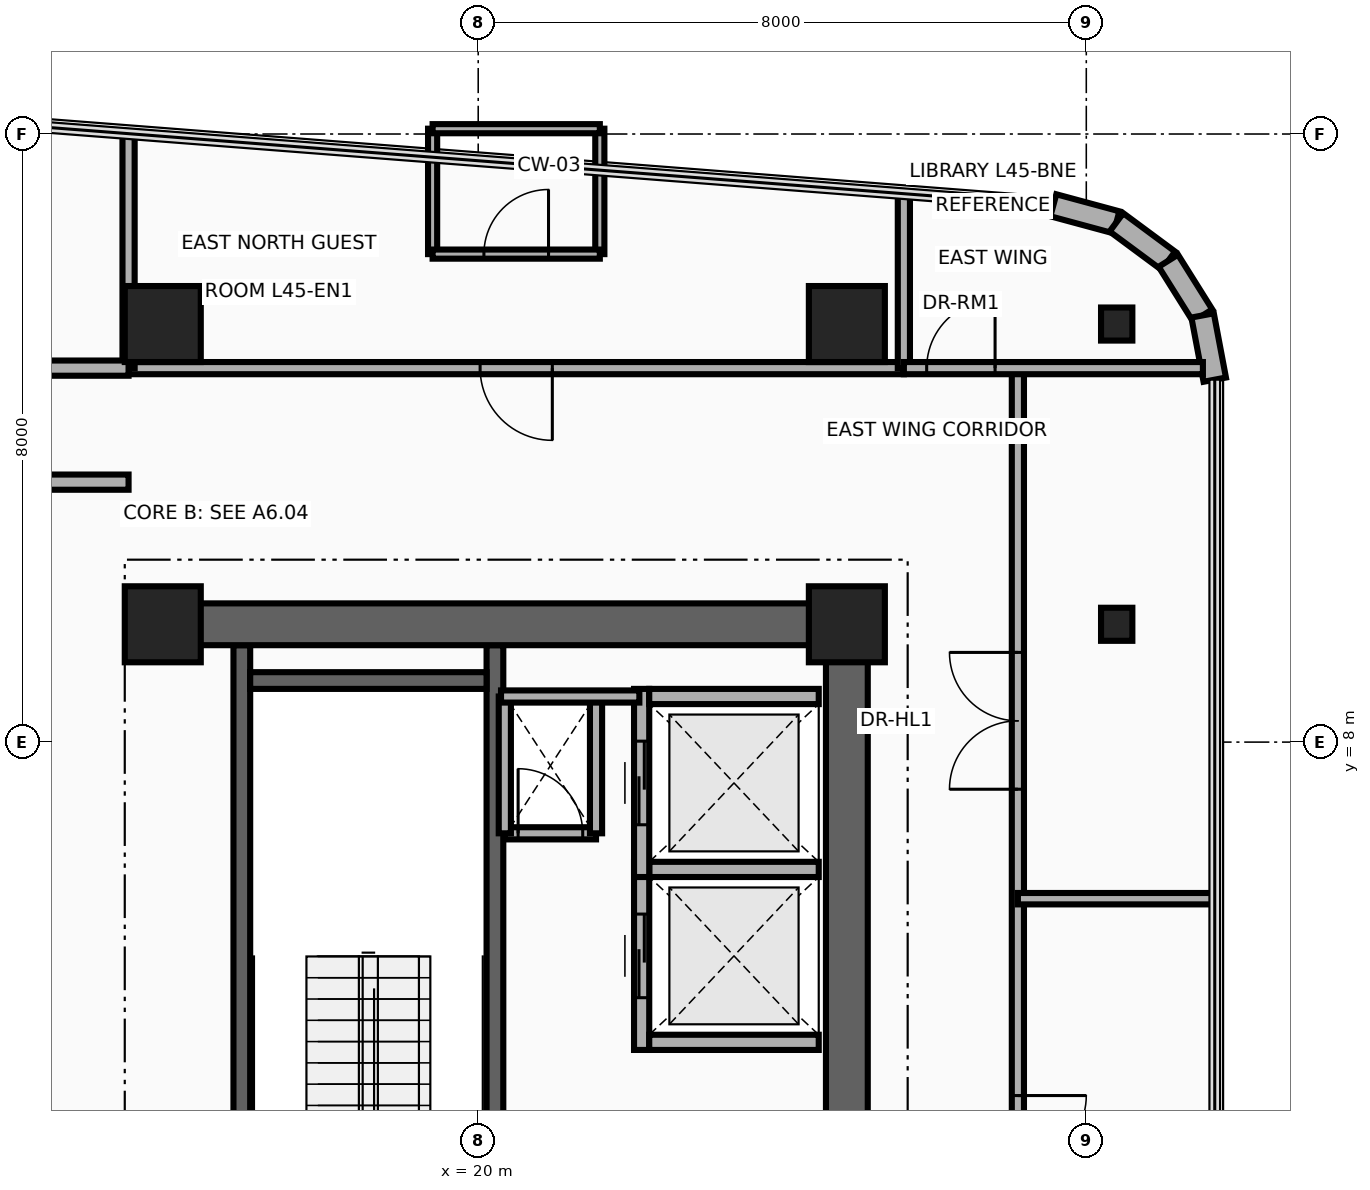
"""IFC4 building model, lengths in metres.
Left out: names, types, materials, properties, quantities, classifications, styles, units other than length and angle.
Written with IfcOpenShell. Run it as: python <this file> out.ifc"""

import sys

from ifc_helpers import new_model, si_unit, direction, frame, frame_2d, origin, origin_2d, place, context, subcontext, project, spatial, rectangle, i_section, extrude, source, transform, mapped, element, fill, save


model = new_model("IFC4")
c1 = context("Model", 3, precision=1e-05, world=origin(), true_north=direction((0.0, 1.0)))
c2 = subcontext(c1, "Body", "Model", "MODEL_VIEW")
j1 = project(units=[si_unit("LENGTHUNIT", "METRE"), si_unit("PLANEANGLEUNIT", "RADIAN")], contexts=[c1])
p1 = place(None, origin())
s1 = spatial("IfcSite", under=j1, at=p1, CompositionType="ELEMENT")
p2 = place(p1, origin())
s2 = spatial("IfcBuilding", under=s1, at=p2, CompositionType="ELEMENT")
p3 = place(p2, frame((0.0, 0.0, 176.55)))
s3 = spatial("IfcBuildingStorey", under=s2, at=p3, CompositionType="ELEMENT", Elevation=176.55)
for number, where, z_axis, x_axis in (
    (1, (16.89, 0.68, 0.0), (0.0, 0.0, 1.0), (0.0, 1.0, 0.0)),
    (2, (20.22, 0.68, 0.0), (0.0, 0.0, 1.0), (0.0, 1.0, 0.0)),
):
    element("IfcWall", number, at=place(p3, frame(where, z_axis=z_axis, x_axis=x_axis)), inside=s3, PredefinedType="SHEAR", context=c2, shape_type="SweptSolid", body=[
        extrude(rectangle(XDim=8.595, YDim=0.22, at=frame_2d((4.297, 0.0))), origin(), (0.0, 0.0, 1.0), 3.63),
    ])
p4 = place(p3, frame((17.0, 8.81, 0.0), z_axis=(0.0, 0.0, 1.0), x_axis=(1.0, 0.0, 0.0)))
e3 = element("IfcWall", 3, at=p4, inside=s3, PredefinedType="SHEAR", context=c2, shape_type="SweptSolid", body=[
    extrude(rectangle(XDim=3.11, YDim=0.22, at=frame_2d((1.555, 0.0))), origin(), (0.0, 0.0, 1.0), 3.63),
])
p5 = place(p3, frame((24.85, 0.95, 0.0), z_axis=(0.0, 0.0, 1.0), x_axis=(0.0, 1.0, 0.0)))
e4 = element("IfcWall", 4, at=p5, inside=s3, PredefinedType="SHEAR", context=c2, shape_type="SweptSolid", body=[
    extrude(rectangle(XDim=8.875, YDim=0.55, at=frame_2d((4.438, 0.0))), origin(), (0.0, 0.0, 1.0), 3.63),
])
p6 = place(p3, frame((15.85, 9.55, 0.0), z_axis=(0.0, 0.0, 1.0), x_axis=(1.0, 0.0, 0.0)))
e5 = element("IfcWall", 5, at=p6, inside=s3, PredefinedType="SHEAR", context=c2, shape_type="SweptSolid", body=[
    extrude(rectangle(XDim=9.0, YDim=0.55, at=frame_2d((4.5, 0.0))), origin(), (0.0, 0.0, 1.0), 3.63),
])
m1 = source(origin(), c2, "Body", "SweptSolid", [
    extrude(rectangle(XDim=1.0, YDim=1.0, at=origin_2d()), origin(), (0.0, 0.0, 1.0), 3.95),
])
for number, where, z_axis, x_axis in (
    (6, (15.85, 9.55, 0.0), (0.0, 0.0, 1.0), (1.0, 0.0, 0.0)),
    (7, (24.85, 9.55, 0.0), (0.0, 0.0, 1.0), (1.0, 0.0, 0.0)),
):
    element("IfcColumn", number, at=place(p3, frame(where, z_axis=z_axis, x_axis=x_axis)), inside=s3, PredefinedType="COLUMN", context=c2, shape_type="MappedRepresentation", body=[
        mapped(m1, transform((0.0, 0.0, 0.0), x_axis=(1.0, 0.0, 0.0), y_axis=(0.0, 1.0, 0.0), z_axis=(0.0, 0.0, 1.0), scale=1.0)),
    ])
m2 = source(origin(), c2, "Body", "SweptSolid", [
    extrude(i_section(OverallWidth=0.412, OverallDepth=0.435, WebThickness=0.036, FlangeThickness=0.057, at=origin_2d()), origin(), (0.0, 0.0, 1.0), 3.95),
])
p7 = place(p3, frame((28.4, 9.55, 0.0), z_axis=(0.0, 0.0, 1.0), x_axis=(1.0, 0.0, 0.0)))
e8 = element("IfcColumn", 8, at=p7, inside=s3, PredefinedType="COLUMN", context=c2, shape_type="MappedRepresentation", body=[
    mapped(m2, transform((0.0, 0.0, 0.0), x_axis=(1.0, 0.0, 0.0), y_axis=(0.0, 1.0, 0.0), z_axis=(0.0, 0.0, 1.0), scale=1.0)),
])
for number, where, z_axis, x_axis in (
    (9, (15.85, 13.5, 0.0), (0.0, 0.0, 1.0), (1.0, 0.0, 0.0)),
    (10, (24.85, 13.5, 0.0), (0.0, 0.0, 1.0), (1.0, 0.0, 0.0)),
):
    element("IfcColumn", number, at=place(p3, frame(where, z_axis=z_axis, x_axis=x_axis)), inside=s3, PredefinedType="COLUMN", context=c2, shape_type="MappedRepresentation", body=[
        mapped(m1, transform((0.0, 0.0, 0.0), x_axis=(1.0, 0.0, 0.0), y_axis=(0.0, 1.0, 0.0), z_axis=(0.0, 0.0, 1.0), scale=1.0)),
    ])
p8 = place(p3, frame((28.4, 13.5, 0.0), z_axis=(0.0, 0.0, 1.0), x_axis=(1.0, 0.0, 0.0)))
e11 = element("IfcColumn", 11, at=p8, inside=s3, PredefinedType="COLUMN", context=c2, shape_type="MappedRepresentation", body=[
    mapped(m2, transform((0.0, 0.0, 0.0), x_axis=(1.0, 0.0, 0.0), y_axis=(0.0, 1.0, 0.0), z_axis=(0.0, 0.0, 1.0), scale=1.0)),
])
p9 = place(p3, frame((27.566, 15.062, 0.0), z_axis=(0.0, 0.0, 1.0), x_axis=(0.965357594382, -0.260930479187, 0.0)))
e12 = element("IfcWall", 12, at=p9, inside=s3, PredefinedType="SOLIDWALL", context=c2, shape_type="SweptSolid", body=[
    extrude(rectangle(XDim=0.86, YDim=0.3, at=frame_2d((0.43, 0.0))), origin(), (0.0, 0.0, 1.0), 3.63),
])
p10 = place(p3, frame((28.396, 14.838, 0.0), z_axis=(0.0, 0.0, 1.0), x_axis=(0.803847397988, -0.594835574548, 0.0)))
e13 = element("IfcWall", 13, at=p10, inside=s3, PredefinedType="SOLIDWALL", context=c2, shape_type="SweptSolid", body=[
    extrude(rectangle(XDim=0.849, YDim=0.3, at=frame_2d((0.425, 0.0))), origin(), (0.0, 0.0, 1.0), 3.63),
])
p11 = place(p3, frame((29.079, 14.333, 0.0), z_axis=(0.0, 0.0, 1.0), x_axis=(0.53134147342, -0.847157741288, 0.0)))
e14 = element("IfcWall", 14, at=p11, inside=s3, PredefinedType="SOLIDWALL", context=c2, shape_type="SweptSolid", body=[
    extrude(rectangle(XDim=0.85, YDim=0.3, at=frame_2d((0.425, 0.0))), origin(), (0.0, 0.0, 1.0), 3.63),
])
p12 = place(p3, frame((29.531, 13.613, 0.0), z_axis=(0.0, 0.0, 1.0), x_axis=(0.185402686284, -0.982662629756, 0.0)))
e15 = element("IfcWall", 15, at=p12, inside=s3, PredefinedType="SOLIDWALL", context=c2, shape_type="SweptSolid", body=[
    extrude(rectangle(XDim=0.86, YDim=0.3, at=frame_2d((0.43, 0.0))), origin(), (0.0, 0.0, 1.0), 3.63),
])
p13 = place(p3, frame((22.15, 3.95, 0.0), z_axis=(0.0, 0.0, 1.0), x_axis=(0.0, 1.0, 0.0)))
e16 = element("IfcWall", 16, at=p13, inside=s3, PredefinedType="MOVABLE", context=c2, shape_type="SweptSolid", body=[
    extrude(rectangle(XDim=2.475, YDim=0.2, at=frame_2d((1.238, 0.0))), origin(), (0.0, 0.0, 1.0), 3.63),
])
p14 = place(p13, frame((0.688, 0.0, 0.0)))
e17 = element("IfcOpeningElement", 17, at=p14, cuts=e16, PredefinedType="OPENING", context=c2, shape_type="SweptSolid", body=[
    extrude(rectangle(XDim=1.1, YDim=2.1, at=frame_2d((0.55, 1.05))), frame((0.0, 0.115, 0.0), z_axis=(0.0, -1.0, 0.0), x_axis=(1.0, 0.0, 0.0)), (0.0, 0.0, 1.0), 0.23),
])
for number, where, z_axis, x_axis in (
    (18, (22.25, 4.05, 0.0), (0.0, 0.0, 1.0), (1.0, 0.0, 0.0)),
    (19, (22.25, 6.325, 0.0), (0.0, 0.0, 1.0), (1.0, 0.0, 0.0)),
):
    element("IfcWall", number, at=place(p3, frame(where, z_axis=z_axis, x_axis=x_axis)), inside=s3, PredefinedType="MOVABLE", context=c2, shape_type="SweptSolid", body=[
        extrude(rectangle(XDim=2.23, YDim=0.2, at=frame_2d((1.115, 0.0))), origin(), (0.0, 0.0, 1.0), 3.63),
    ])
p15 = place(p3, frame((22.15, 6.225, 0.0), z_axis=(0.0, 0.0, 1.0), x_axis=(0.0, 1.0, 0.0)))
e20 = element("IfcWall", 20, at=p15, inside=s3, PredefinedType="MOVABLE", context=c2, shape_type="SweptSolid", body=[
    extrude(rectangle(XDim=2.475, YDim=0.2, at=frame_2d((1.237, 0.0))), origin(), (0.0, 0.0, 1.0), 3.63),
])
p16 = place(p15, frame((0.688, 0.0, 0.0)))
e21 = element("IfcOpeningElement", 21, at=p16, cuts=e20, PredefinedType="OPENING", context=c2, shape_type="SweptSolid", body=[
    extrude(rectangle(XDim=1.1, YDim=2.1, at=frame_2d((0.55, 1.05))), frame((0.0, 0.115, 0.0), z_axis=(0.0, -1.0, 0.0), x_axis=(1.0, 0.0, 0.0)), (0.0, 0.0, 1.0), 0.23),
])
p17 = place(p3, frame((22.25, 8.6, 0.0), z_axis=(0.0, 0.0, 1.0), x_axis=(1.0, 0.0, 0.0)))
e22 = element("IfcWall", 22, at=p17, inside=s3, PredefinedType="MOVABLE", context=c2, shape_type="SweptSolid", body=[
    extrude(rectangle(XDim=2.23, YDim=0.2, at=frame_2d((1.115, 0.0))), origin(), (0.0, 0.0, 1.0), 3.63),
])
p18 = place(p3, frame((20.35, 6.8, 0.0), z_axis=(0.0, 0.0, 1.0), x_axis=(1.0, 0.0, 0.0)))
e23 = element("IfcWall", 23, at=p18, inside=s3, PredefinedType="PARTITIONING", context=c2, shape_type="SweptSolid", body=[
    extrude(rectangle(XDim=1.2, YDim=0.16, at=frame_2d((0.6, 0.0))), origin(), (0.0, 0.0, 1.0), 3.63),
])
p19 = place(p18, frame((0.175, 0.0, 0.0)))
e24 = element("IfcOpeningElement", 24, at=p19, cuts=e23, PredefinedType="OPENING", context=c2, shape_type="SweptSolid", body=[
    extrude(rectangle(XDim=0.85, YDim=2.05, at=frame_2d((0.425, 1.025))), frame((0.0, 0.095, 0.0), z_axis=(0.0, -1.0, 0.0), x_axis=(1.0, 0.0, 0.0)), (0.0, 0.0, 1.0), 0.19),
])
for number, where, z_axis, x_axis in (
    (25, (21.55, 6.8, 0.0), (0.0, 0.0, 1.0), (0.0, 1.0, 0.0)),
    (26, (20.35, 6.8, 0.0), (0.0, 0.0, 1.0), (0.0, 1.0, 0.0)),
):
    element("IfcWall", number, at=place(p3, frame(where, z_axis=z_axis, x_axis=x_axis)), inside=s3, PredefinedType="PARTITIONING", context=c2, shape_type="SweptSolid", body=[
        extrude(rectangle(XDim=1.8, YDim=0.16, at=frame_2d((0.9, 0.0))), origin(), (0.0, 0.0, 1.0), 3.63),
    ])
p20 = place(p3, frame((20.3, 8.6, 0.0), z_axis=(0.0, 0.0, 1.0), x_axis=(1.0, 0.0, 0.0)))
e27 = element("IfcWall", 27, at=p20, inside=s3, PredefinedType="PARTITIONING", context=c2, shape_type="SweptSolid", body=[
    extrude(rectangle(XDim=1.82, YDim=0.16, at=frame_2d((0.91, 0.0))), origin(), (0.0, 0.0, 1.0), 3.63),
])
p21 = place(p3, frame((15.4, 12.92, 0.0), z_axis=(0.0, 0.0, 1.0), x_axis=(1.0, 0.0, 0.0)))
e28 = element("IfcWall", 28, at=p21, inside=s3, PredefinedType="PARTITIONING", context=c2, shape_type="SweptSolid", body=[
    extrude(rectangle(XDim=10.2, YDim=0.16, at=frame_2d((5.1, 0.0))), origin(), (0.0, 0.0, 1.0), 3.004),
])
p22 = place(p21, frame((4.625, 0.0, 0.0)))
e29 = element("IfcOpeningElement", 29, at=p22, cuts=e28, PredefinedType="OPENING", context=c2, shape_type="SweptSolid", body=[
    extrude(rectangle(XDim=0.95, YDim=2.15, at=frame_2d((0.475, 1.075))), frame((0.0, 0.095, 0.0), z_axis=(0.0, -1.0, 0.0), x_axis=(1.0, 0.0, 0.0)), (0.0, 0.0, 1.0), 0.19),
])
p23 = place(p3, frame((15.4, 12.92, 0.0), z_axis=(0.0, 0.0, 1.0), x_axis=(0.0, 1.0, 0.0)))
e30 = element("IfcWall", 30, at=p23, inside=s3, PredefinedType="PARTITIONING", context=c2, shape_type="SweptSolid", body=[
    extrude(rectangle(XDim=3.084, YDim=0.16, at=frame_2d((1.542, 0.0))), origin(), (0.0, 0.0, 1.0), 2.665),
])
p24 = place(p3, frame((25.6, 12.92, 0.0), z_axis=(0.0, 0.0, 1.0), x_axis=(0.0, 1.0, 0.0)))
e31 = element("IfcWall", 31, at=p24, inside=s3, PredefinedType="PARTITIONING", context=c2, shape_type="SweptSolid", body=[
    extrude(rectangle(XDim=2.295, YDim=0.16, at=frame_2d((1.147, 0.0))), origin(), (0.0, 0.0, 1.0), 2.665),
])
for number, where, z_axis, x_axis in (
    (32, (19.4, 14.42, 0.0), (0.0, 0.0, 1.0), (0.0, 1.0, 0.0)),
    (33, (21.6, 14.42, 0.0), (0.0, 0.0, 1.0), (0.0, 1.0, 0.0)),
):
    element("IfcWall", number, at=place(p3, frame(where, z_axis=z_axis, x_axis=x_axis)), inside=s3, PredefinedType="PARTITIONING", context=c2, shape_type="SweptSolid", body=[
        extrude(rectangle(XDim=1.65, YDim=0.12, at=frame_2d((0.825, 0.0))), origin(), (0.0, 0.0, 1.0), 3.63),
    ])
p25 = place(p3, frame((19.4, 16.07, 0.0), z_axis=(0.0, 0.0, 1.0), x_axis=(1.0, 0.0, 0.0)))
e34 = element("IfcWall", 34, at=p25, inside=s3, PredefinedType="PARTITIONING", context=c2, shape_type="SweptSolid", body=[
    extrude(rectangle(XDim=2.2, YDim=0.12, at=frame_2d((1.1, 0.0))), origin(), (0.0, 0.0, 1.0), 3.63),
])
p26 = place(p3, frame((19.4, 14.42, 0.0), z_axis=(0.0, 0.0, 1.0), x_axis=(1.0, 0.0, 0.0)))
e35 = element("IfcWall", 35, at=p26, inside=s3, PredefinedType="PARTITIONING", context=c2, shape_type="SweptSolid", body=[
    extrude(rectangle(XDim=2.2, YDim=0.12, at=frame_2d((1.1, 0.0))), origin(), (0.0, 0.0, 1.0), 3.63),
])
p27 = place(p26, frame((0.675, 0.0, 0.0)))
e36 = element("IfcOpeningElement", 36, at=p27, cuts=e35, PredefinedType="OPENING", context=c2, shape_type="SweptSolid", body=[
    extrude(rectangle(XDim=0.85, YDim=2.1, at=frame_2d((0.425, 1.05))), frame((0.0, 0.075, 0.0), z_axis=(0.0, -1.0, 0.0), x_axis=(1.0, 0.0, 0.0)), (0.0, 0.0, 1.0), 0.15),
])
p28 = place(p3, frame((27.1, -11.89, 0.0), z_axis=(0.0, 0.0, 1.0), x_axis=(0.0, 1.0, 0.0)))
e37 = element("IfcWall", 37, at=p28, inside=s3, PredefinedType="PARTITIONING", context=c2, shape_type="SweptSolid", body=[
    extrude(rectangle(XDim=24.81, YDim=0.16, at=frame_2d((12.405, 0.0))), origin(), (0.0, 0.0, 1.0), 2.665),
])
p29 = place(p28, frame((1.12, 0.0, 0.0)))
e38 = element("IfcOpeningElement", 38, at=p29, cuts=e37, PredefinedType="OPENING", context=c2, shape_type="SweptSolid", body=[
    extrude(rectangle(XDim=0.9, YDim=2.1, at=frame_2d((0.45, 1.05))), frame((0.0, 0.095, 0.0), z_axis=(0.0, -1.0, 0.0), x_axis=(1.0, 0.0, 0.0)), (0.0, 0.0, 1.0), 0.19),
])
p30 = place(p28, frame((6.46, 0.0, 0.0)))
e39 = element("IfcOpeningElement", 39, at=p30, cuts=e37, PredefinedType="OPENING", context=c2, shape_type="SweptSolid", body=[
    extrude(rectangle(XDim=1.8, YDim=2.15, at=frame_2d((0.9, 1.075))), frame((0.0, 0.095, 0.0), z_axis=(0.0, -1.0, 0.0), x_axis=(1.0, 0.0, 0.0)), (0.0, 0.0, 1.0), 0.19),
])
p31 = place(p28, frame((13.44, 0.0, 0.0)))
e40 = element("IfcOpeningElement", 40, at=p31, cuts=e37, PredefinedType="OPENING", context=c2, shape_type="SweptSolid", body=[
    extrude(rectangle(XDim=1.8, YDim=2.15, at=frame_2d((0.9, 1.075))), frame((0.0, 0.095, 0.0), z_axis=(0.0, -1.0, 0.0), x_axis=(1.0, 0.0, 0.0)), (0.0, 0.0, 1.0), 0.19),
])
p32 = place(p28, frame((19.27, 0.0, 0.0)))
e41 = element("IfcOpeningElement", 41, at=p32, cuts=e37, PredefinedType="OPENING", context=c2, shape_type="SweptSolid", body=[
    extrude(rectangle(XDim=1.8, YDim=2.15, at=frame_2d((0.9, 1.075))), frame((0.0, 0.095, 0.0), z_axis=(0.0, -1.0, 0.0), x_axis=(1.0, 0.0, 0.0)), (0.0, 0.0, 1.0), 0.19),
])
p33 = place(p3, frame((25.6, 12.92, 0.0), z_axis=(0.0, 0.0, 1.0), x_axis=(1.0, 0.0, 0.0)))
e42 = element("IfcWall", 42, at=p33, inside=s3, PredefinedType="PARTITIONING", context=c2, shape_type="SweptSolid", body=[
    extrude(rectangle(XDim=3.934, YDim=0.16, at=frame_2d((1.967, 0.0))), origin(), (0.0, 0.0, 1.0), 3.076),
])
p34 = place(p33, frame((0.3, 0.0, 0.0)))
e43 = element("IfcOpeningElement", 43, at=p34, cuts=e42, PredefinedType="OPENING", context=c2, shape_type="SweptSolid", body=[
    extrude(rectangle(XDim=0.9, YDim=2.1, at=frame_2d((0.45, 1.05))), frame((0.0, 0.095, 0.0), z_axis=(0.0, -1.0, 0.0), x_axis=(1.0, 0.0, 0.0)), (0.0, 0.0, 1.0), 0.19),
])
p35 = place(p3, frame((27.1, 5.94, 0.0), z_axis=(0.0, 0.0, 1.0), x_axis=(1.0, 0.0, 0.0)))
e44 = element("IfcWall", 44, at=p35, inside=s3, PredefinedType="PARTITIONING", context=c2, shape_type="SweptSolid", body=[
    extrude(rectangle(XDim=2.59, YDim=0.15, at=frame_2d((1.295, 0.0))), origin(), (0.0, 0.0, 1.0), 3.076),
])
for number, where, z_axis, x_axis in (
    (45, (13.42, 12.92, 0.0), (0.0, 0.0, 1.0), (1.0, 0.0, 0.0)),
    (46, (13.42, 11.42, 0.0), (0.0, 0.0, 1.0), (1.0, 0.0, 0.0)),
):
    element("IfcWall", number, at=place(p3, frame(where, z_axis=z_axis, x_axis=x_axis)), inside=s3, PredefinedType="PARTITIONING", context=c2, shape_type="SweptSolid", body=[
        extrude(rectangle(XDim=1.98, YDim=0.2, at=frame_2d((0.99, 0.0))), origin(), (0.0, 0.0, 1.0), 3.004),
    ])
p36 = place(p14, origin())
e47 = element("IfcDoor", 47, at=p36, inside=s3, OperationType="DOUBLE_DOOR_SLIDING", PredefinedType="DOOR", context=c2, shape_type="SweptSolid", body=[
    extrude(rectangle(XDim=1.1, YDim=2.1, at=frame_2d((0.55, 1.05))), frame((0.0, 0.025, 0.0), z_axis=(0.0, -1.0, 0.0), x_axis=(1.0, 0.0, 0.0)), (0.0, 0.0, 1.0), 0.05),
])
fill(e17, e47)
p37 = place(p16, origin())
e48 = element("IfcDoor", 48, at=p37, inside=s3, OperationType="DOUBLE_DOOR_SLIDING", PredefinedType="DOOR", context=c2, shape_type="SweptSolid", body=[
    extrude(rectangle(XDim=1.1, YDim=2.1, at=frame_2d((0.55, 1.05))), frame((0.0, 0.025, 0.0), z_axis=(0.0, -1.0, 0.0), x_axis=(1.0, 0.0, 0.0)), (0.0, 0.0, 1.0), 0.05),
])
fill(e21, e48)
p38 = place(p19, origin())
e49 = element("IfcDoor", 49, at=p38, inside=s3, OperationType="SINGLE_SWING_RIGHT", PredefinedType="DOOR", context=c2, shape_type="SweptSolid", body=[
    extrude(rectangle(XDim=0.85, YDim=2.05, at=frame_2d((0.425, 1.025))), frame((0.0, 0.025, 0.0), z_axis=(0.0, -1.0, 0.0), x_axis=(1.0, 0.0, 0.0)), (0.0, 0.0, 1.0), 0.05),
])
fill(e24, e49)
p39 = place(p22, frame((0.95, 0.0, 0.0), z_axis=(0.0, 0.0, 1.0), x_axis=(-1.0, 0.0, 0.0)))
e50 = element("IfcDoor", 50, at=p39, inside=s3, OperationType="SINGLE_SWING_LEFT", PredefinedType="DOOR", context=c2, shape_type="SweptSolid", body=[
    extrude(rectangle(XDim=0.95, YDim=2.15, at=frame_2d((0.475, 1.075))), frame((0.0, 0.025, 0.0), z_axis=(0.0, -1.0, 0.0), x_axis=(1.0, 0.0, 0.0)), (0.0, 0.0, 1.0), 0.05),
])
fill(e29, e50)
p40 = place(p27, origin())
e51 = element("IfcDoor", 51, at=p40, inside=s3, OperationType="SINGLE_SWING_RIGHT", PredefinedType="DOOR", context=c2, shape_type="SweptSolid", body=[
    extrude(rectangle(XDim=0.85, YDim=2.1, at=frame_2d((0.425, 1.05))), frame((0.0, 0.025, 0.0), z_axis=(0.0, -1.0, 0.0), x_axis=(1.0, 0.0, 0.0)), (0.0, 0.0, 1.0), 0.05),
])
fill(e36, e51)
p41 = place(p34, origin())
e52 = element("IfcDoor", 52, at=p41, inside=s3, OperationType="SINGLE_SWING_RIGHT", PredefinedType="DOOR", context=c2, shape_type="SweptSolid", body=[
    extrude(rectangle(XDim=0.9, YDim=2.1, at=frame_2d((0.45, 1.05))), frame((0.0, 0.025, 0.0), z_axis=(0.0, -1.0, 0.0), x_axis=(1.0, 0.0, 0.0)), (0.0, 0.0, 1.0), 0.05),
])
fill(e43, e52)
p42 = place(p31, frame((1.8, 0.0, 0.0), z_axis=(0.0, 0.0, 1.0), x_axis=(-1.0, 0.0, 0.0)))
e53 = element("IfcDoor", 53, at=p42, inside=s3, OperationType="DOUBLE_DOOR_SINGLE_SWING", PredefinedType="DOOR", context=c2, shape_type="SweptSolid", body=[
    extrude(rectangle(XDim=1.8, YDim=2.15, at=frame_2d((0.9, 1.075))), frame((0.0, 0.025, 0.0), z_axis=(0.0, -1.0, 0.0), x_axis=(1.0, 0.0, 0.0)), (0.0, 0.0, 1.0), 0.05),
])
fill(e40, e53)
p43 = place(p32, origin())
e54 = element("IfcDoor", 54, at=p43, inside=s3, OperationType="DOUBLE_DOOR_SINGLE_SWING", PredefinedType="DOOR", context=c2, shape_type="SweptSolid", body=[
    extrude(rectangle(XDim=1.8, YDim=2.15, at=frame_2d((0.9, 1.075))), frame((0.0, 0.025, 0.0), z_axis=(0.0, -1.0, 0.0), x_axis=(1.0, 0.0, 0.0)), (0.0, 0.0, 1.0), 0.05),
])
fill(e41, e54)
save(model, sys.argv[1])
